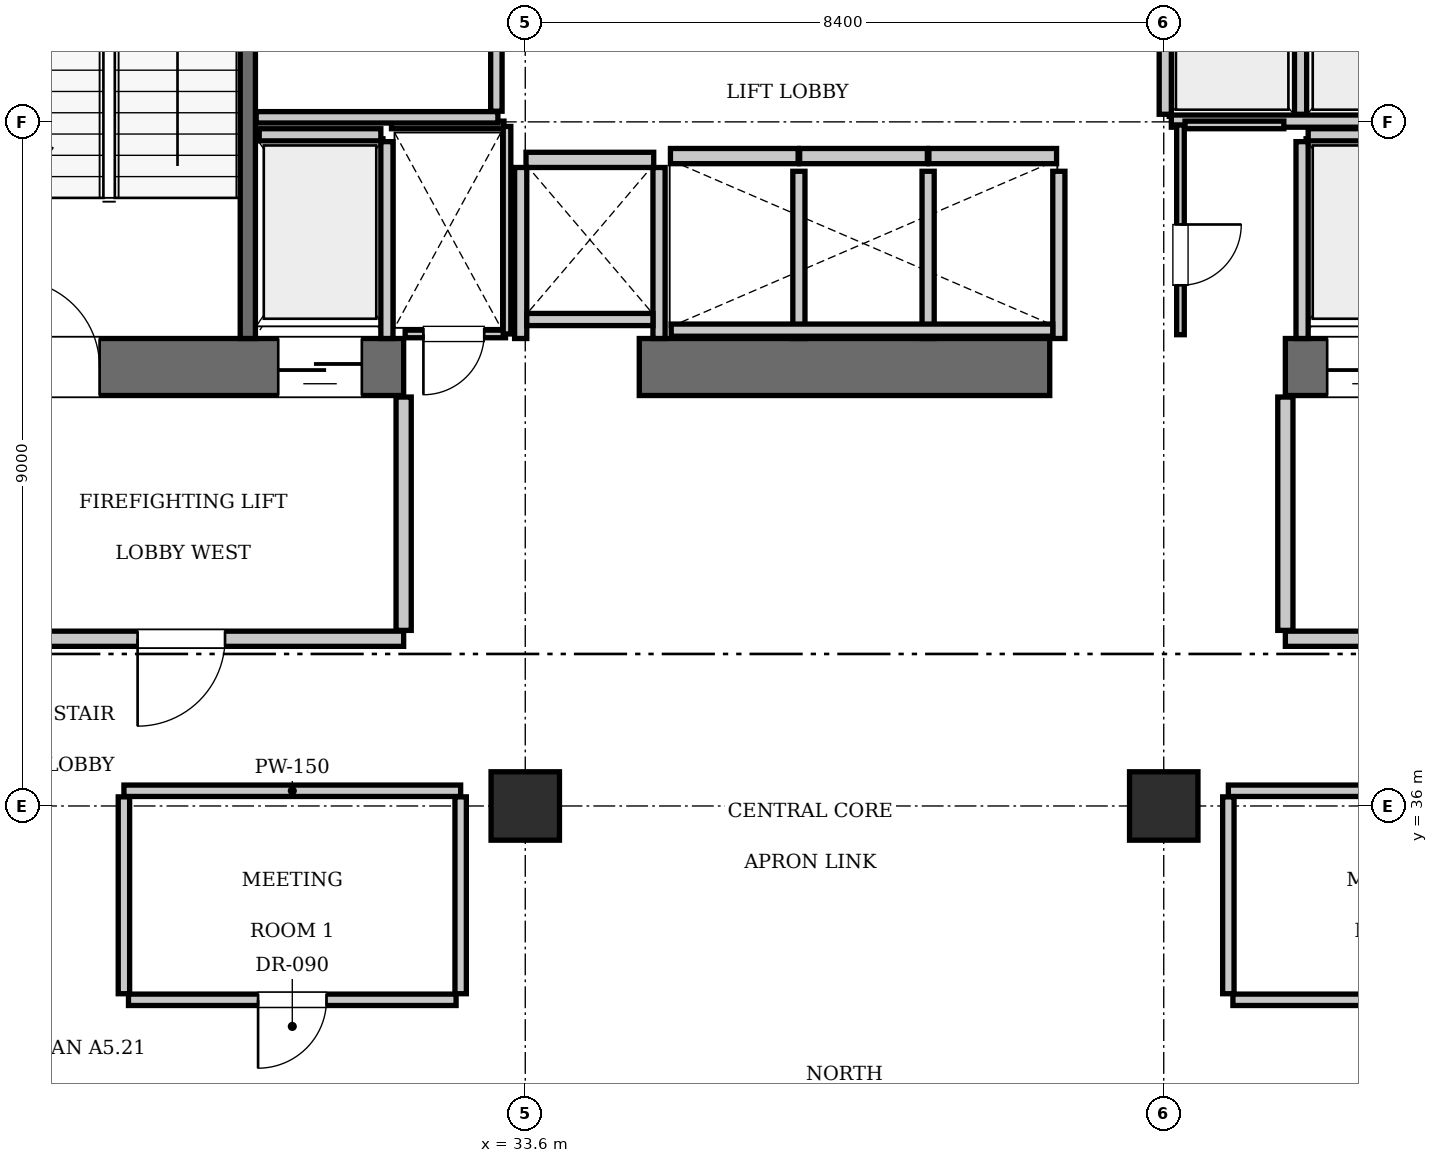
"""IFC4 building model, lengths in metres.
Left out: names, types, materials, properties, quantities, classifications, styles, units other than length and angle.
Written with IfcOpenShell. Run it as: python <this file> out.ifc"""

import sys

from ifc_helpers import new_model, si_unit, direction, frame, frame_2d, origin, origin_2d, place, context, subcontext, project, spatial, rectangle, extrude, element, fill, save


model = new_model("IFC4")
c1 = context("Model", 3, precision=1e-05, world=origin(), true_north=direction((0.0, 1.0)))
c2 = subcontext(c1, "Body", "Model", "MODEL_VIEW")
j1 = project(units=[si_unit("LENGTHUNIT", "METRE"), si_unit("PLANEANGLEUNIT", "RADIAN")], contexts=[c1])
p1 = place(None, origin())
s1 = spatial("IfcSite", under=j1, at=p1, CompositionType="ELEMENT")
p2 = place(p1, origin())
s2 = spatial("IfcBuilding", under=s1, at=p2, CompositionType="ELEMENT")
p3 = place(p2, frame((0.0, 0.0, 177.45)))
s3 = spatial("IfcBuildingStorey", under=s2, at=p3, CompositionType="ELEMENT", Elevation=177.45)
p4 = place(p3, frame((25.2, 41.775, 0.0), z_axis=(0.0, 0.0, 1.0), x_axis=(1.0, 0.0, 0.0)))
e1 = element("IfcWall", 1, at=p4, inside=s3, PredefinedType="SHEAR", context=c2, shape_type="SweptSolid", body=[
    extrude(rectangle(XDim=6.8, YDim=0.75, at=frame_2d((3.4, 0.0))), origin(), (0.0, 0.0, 1.0), 3.85),
])
p5 = place(p4, frame((1.65, 0.0, 0.0)))
e2 = element("IfcOpeningElement", 2, at=p5, cuts=e1, PredefinedType="OPENING", context=c2, shape_type="SweptSolid", body=[
    extrude(rectangle(XDim=1.15, YDim=2.15, at=frame_2d((0.575, 1.075))), frame((0.0, 0.385, 0.0), z_axis=(0.0, -1.0, 0.0), x_axis=(1.0, 0.0, 0.0)), (0.0, 0.0, 1.0), 0.77),
])
p6 = place(p4, frame((5.15, 0.0, 0.0)))
e3 = element("IfcOpeningElement", 3, at=p6, cuts=e1, PredefinedType="OPENING", context=c2, shape_type="SweptSolid", body=[
    extrude(rectangle(XDim=1.1, YDim=2.2, at=frame_2d((0.55, 1.1))), frame((0.0, 0.385, 0.0), z_axis=(0.0, -1.0, 0.0), x_axis=(1.0, 0.0, 0.0)), (0.0, 0.0, 1.0), 0.77),
])
p7 = place(p3, frame((35.1, 41.775, 0.0), z_axis=(0.0, 0.0, 1.0), x_axis=(1.0, 0.0, 0.0)))
e4 = element("IfcWall", 4, at=p7, inside=s3, PredefinedType="SHEAR", context=c2, shape_type="SweptSolid", body=[
    extrude(rectangle(XDim=5.4, YDim=0.75, at=frame_2d((2.7, 0.0))), origin(), (0.0, 0.0, 1.0), 3.85),
])
p8 = place(p3, frame((43.6, 41.775, 0.0), z_axis=(0.0, 0.0, 1.0), x_axis=(1.0, 0.0, 0.0)))
e5 = element("IfcWall", 5, at=p8, inside=s3, PredefinedType="SHEAR", context=c2, shape_type="SweptSolid", body=[
    extrude(rectangle(XDim=6.8, YDim=0.75, at=frame_2d((3.4, 0.0))), origin(), (0.0, 0.0, 1.0), 3.85),
])
p9 = place(p8, frame((3.9, 0.0, 0.0)))
e6 = element("IfcOpeningElement", 6, at=p9, cuts=e5, PredefinedType="OPENING", context=c2, shape_type="SweptSolid", body=[
    extrude(rectangle(XDim=1.15, YDim=2.15, at=frame_2d((0.575, 1.075))), frame((0.0, 0.385, 0.0), z_axis=(0.0, -1.0, 0.0), x_axis=(1.0, 0.0, 0.0)), (0.0, 0.0, 1.0), 0.77),
])
p10 = place(p8, frame((0.55, 0.0, 0.0)))
e7 = element("IfcOpeningElement", 7, at=p10, cuts=e5, PredefinedType="OPENING", context=c2, shape_type="SweptSolid", body=[
    extrude(rectangle(XDim=1.1, YDim=2.2, at=frame_2d((0.55, 1.1))), frame((0.0, 0.385, 0.0), z_axis=(0.0, -1.0, 0.0), x_axis=(1.0, 0.0, 0.0)), (0.0, 0.0, 1.0), 0.77),
])
for number, where, z_axis, x_axis in (
    (8, (33.6, 36.0, 0.0), (0.0, 0.0, 1.0), (1.0, 0.0, 0.0)),
    (9, (42.0, 36.0, 0.0), (0.0, 0.0, 1.0), (1.0, 0.0, 0.0)),
):
    element("IfcColumn", number, at=place(p3, frame(where, z_axis=z_axis, x_axis=x_axis)), inside=s3, PredefinedType="COLUMN", context=c2, shape_type="SweptSolid", body=[
        extrude(rectangle(XDim=0.9, YDim=0.9, at=origin_2d()), origin(), (0.0, 0.0, 1.0), 3.85),
    ])
p11 = place(p3, frame((29.95, 42.15, 0.0), z_axis=(0.0, 0.0, 1.0), x_axis=(0.0, 1.0, 0.0)))
e10 = element("IfcWall", 10, at=p11, inside=s3, PredefinedType="SOLIDWALL", context=c2, shape_type="SweptSolid", body=[
    extrude(rectangle(XDim=9.0, YDim=0.2, at=frame_2d((4.5, 0.0))), origin(), (0.0, 0.0, 1.0), 3.61),
])
for number, where, z_axis, x_axis in (
    (11, (35.51, 44.55, 0.0), (0.0, 0.0, 1.0), (1.0, 0.0, 0.0)),
    (12, (37.21, 44.55, 0.0), (0.0, 0.0, 1.0), (1.0, 0.0, 0.0)),
):
    element("IfcWall", number, at=place(p3, frame(where, z_axis=z_axis, x_axis=x_axis)), inside=s3, PredefinedType="SOLIDWALL", context=c2, shape_type="SweptSolid", body=[
        extrude(rectangle(XDim=1.68, YDim=0.2, at=frame_2d((0.84, 0.0))), origin(), (0.0, 0.0, 1.0), 3.61),
    ])
p12 = place(p3, frame((38.91, 44.55, 0.0), z_axis=(0.0, 0.0, 1.0), x_axis=(1.0, 0.0, 0.0)))
e13 = element("IfcWall", 13, at=p12, inside=s3, PredefinedType="SOLIDWALL", context=c2, shape_type="SweptSolid", body=[
    extrude(rectangle(XDim=1.68, YDim=0.2, at=frame_2d((0.84, 0.0))), origin(), (0.0, 0.0, 1.0), 3.61),
])
p13 = place(p3, frame((33.61, 44.5, 0.0), z_axis=(0.0, 0.0, 1.0), x_axis=(1.0, 0.0, 0.0)))
e14 = element("IfcWall", 14, at=p13, inside=s3, PredefinedType="SOLIDWALL", context=c2, shape_type="SweptSolid", body=[
    extrude(rectangle(XDim=1.68, YDim=0.2, at=frame_2d((0.84, 0.0))), origin(), (0.0, 0.0, 1.0), 3.61),
])
p14 = place(p3, frame((30.1, 44.83, 0.0), z_axis=(0.0, 0.0, 1.0), x_axis=(1.0, 0.0, 0.0)))
e15 = element("IfcWall", 15, at=p14, inside=s3, PredefinedType="SOLIDWALL", context=c2, shape_type="SweptSolid", body=[
    extrude(rectangle(XDim=1.6, YDim=0.16, at=frame_2d((0.8, 0.0))), origin(), (0.0, 0.0, 1.0), 3.61),
])
p15 = place(p3, frame((31.78, 42.15, 0.0), z_axis=(0.0, 0.0, 1.0), x_axis=(0.0, 1.0, 0.0)))
e16 = element("IfcWall", 16, at=p15, inside=s3, PredefinedType="SOLIDWALL", context=c2, shape_type="SweptSolid", body=[
    extrude(rectangle(XDim=2.59, YDim=0.16, at=frame_2d((1.295, 0.0))), origin(), (0.0, 0.0, 1.0), 3.61),
])
p16 = place(p3, frame((43.9, 44.83, 0.0), z_axis=(0.0, 0.0, 1.0), x_axis=(1.0, 0.0, 0.0)))
e17 = element("IfcWall", 17, at=p16, inside=s3, PredefinedType="SOLIDWALL", context=c2, shape_type="SweptSolid", body=[
    extrude(rectangle(XDim=1.6, YDim=0.16, at=frame_2d((0.8, 0.0))), origin(), (0.0, 0.0, 1.0), 3.61),
])
p17 = place(p3, frame((43.82, 42.15, 0.0), z_axis=(0.0, 0.0, 1.0), x_axis=(0.0, 1.0, 0.0)))
e18 = element("IfcWall", 18, at=p17, inside=s3, PredefinedType="SOLIDWALL", context=c2, shape_type="SweptSolid", body=[
    extrude(rectangle(XDim=2.59, YDim=0.16, at=frame_2d((1.295, 0.0))), origin(), (0.0, 0.0, 1.0), 3.61),
])
for number, where, z_axis, x_axis in (
    (19, (42.02, 45.1, 0.0), (0.0, 0.0, 1.0), (0.0, 1.0, 0.0)),
    (20, (43.8, 45.1, 0.0), (0.0, 0.0, 1.0), (0.0, 1.0, 0.0)),
):
    element("IfcWall", number, at=place(p3, frame(where, z_axis=z_axis, x_axis=x_axis)), inside=s3, PredefinedType="SOLIDWALL", context=c2, shape_type="SweptSolid", body=[
        extrude(rectangle(XDim=1.95, YDim=0.16, at=frame_2d((0.975, 0.0))), origin(), (0.0, 0.0, 1.0), 3.61),
    ])
p18 = place(p3, frame((42.1, 45.01, 0.0), z_axis=(0.0, 0.0, 1.0), x_axis=(1.0, 0.0, 0.0)))
e21 = element("IfcWall", 21, at=p18, inside=s3, PredefinedType="SOLIDWALL", context=c2, shape_type="SweptSolid", body=[
    extrude(rectangle(XDim=3.45, YDim=0.16, at=frame_2d((1.725, 0.0))), origin(), (0.0, 0.0, 1.0), 3.61),
])
for number, where, z_axis, x_axis in (
    (22, (37.2, 42.15, 0.0), (0.0, 0.0, 1.0), (0.0, 1.0, 0.0)),
    (23, (38.9, 42.15, 0.0), (0.0, 0.0, 1.0), (0.0, 1.0, 0.0)),
    (24, (40.62, 42.15, 0.0), (0.0, 0.0, 1.0), (0.0, 1.0, 0.0)),
):
    element("IfcWall", number, at=place(p3, frame(where, z_axis=z_axis, x_axis=x_axis)), inside=s3, PredefinedType="SOLIDWALL", context=c2, shape_type="SweptSolid", body=[
        extrude(rectangle(XDim=2.2, YDim=0.16, at=frame_2d((1.1, 0.0))), origin(), (0.0, 0.0, 1.0), 3.61),
    ])
p19 = place(p3, frame((35.52, 42.26, 0.0), z_axis=(0.0, 0.0, 1.0), x_axis=(1.0, 0.0, 0.0)))
e25 = element("IfcWall", 25, at=p19, inside=s3, PredefinedType="SOLIDWALL", context=c2, shape_type="SweptSolid", body=[
    extrude(rectangle(XDim=5.02, YDim=0.16, at=frame_2d((2.51, 0.0))), origin(), (0.0, 0.0, 1.0), 3.61),
])
for number, where, z_axis, x_axis in (
    (26, (33.54, 42.15, 0.0), (0.0, 0.0, 1.0), (0.0, 1.0, 0.0)),
    (27, (35.36, 42.15, 0.0), (0.0, 0.0, 1.0), (0.0, 1.0, 0.0)),
):
    element("IfcWall", number, at=place(p3, frame(where, z_axis=z_axis, x_axis=x_axis)), inside=s3, PredefinedType="SOLIDWALL", context=c2, shape_type="SweptSolid", body=[
        extrude(rectangle(XDim=2.25, YDim=0.16, at=frame_2d((1.125, 0.0))), origin(), (0.0, 0.0, 1.0), 3.61),
    ])
p20 = place(p3, frame((33.62, 42.4, 0.0), z_axis=(0.0, 0.0, 1.0), x_axis=(1.0, 0.0, 0.0)))
e28 = element("IfcWall", 28, at=p20, inside=s3, PredefinedType="SOLIDWALL", context=c2, shape_type="SweptSolid", body=[
    extrude(rectangle(XDim=1.66, YDim=0.16, at=frame_2d((0.83, 0.0))), origin(), (0.0, 0.0, 1.0), 3.61),
])
p21 = place(p3, frame((26.2, 38.2, 0.0), z_axis=(0.0, 0.0, 1.0), x_axis=(1.0, 0.0, 0.0)))
e29 = element("IfcWall", 29, at=p21, inside=s3, PredefinedType="PARTITIONING", context=c2, shape_type="SweptSolid", body=[
    extrude(rectangle(XDim=5.8, YDim=0.2, at=frame_2d((2.9, 0.0))), origin(), (0.0, 0.0, 1.0), 3.61),
])
p22 = place(p21, frame((2.3, 0.0, 0.0)))
e30 = element("IfcOpeningElement", 30, at=p22, cuts=e29, PredefinedType="OPENING", context=c2, shape_type="SweptSolid", body=[
    extrude(rectangle(XDim=1.15, YDim=2.15, at=frame_2d((0.575, 1.075))), frame((0.0, 0.11, 0.0), z_axis=(0.0, -1.0, 0.0), x_axis=(1.0, 0.0, 0.0)), (0.0, 0.0, 1.0), 0.22),
])
p23 = place(p3, frame((32.0, 38.31, 0.0), z_axis=(0.0, 0.0, 1.0), x_axis=(0.0, 1.0, 0.0)))
e31 = element("IfcWall", 31, at=p23, inside=s3, PredefinedType="PARTITIONING", context=c2, shape_type="SweptSolid", body=[
    extrude(rectangle(XDim=3.07, YDim=0.2, at=frame_2d((1.535, 0.0))), origin(), (0.0, 0.0, 1.0), 3.61),
])
p24 = place(p3, frame((43.6, 38.2, 0.0), z_axis=(0.0, 0.0, 1.0), x_axis=(1.0, 0.0, 0.0)))
e32 = element("IfcWall", 32, at=p24, inside=s3, PredefinedType="PARTITIONING", context=c2, shape_type="SweptSolid", body=[
    extrude(rectangle(XDim=5.8, YDim=0.2, at=frame_2d((2.9, 0.0))), origin(), (0.0, 0.0, 1.0), 3.61),
])
p25 = place(p24, frame((2.3, 0.0, 0.0)))
e33 = element("IfcOpeningElement", 33, at=p25, cuts=e32, PredefinedType="OPENING", context=c2, shape_type="SweptSolid", body=[
    extrude(rectangle(XDim=1.15, YDim=2.15, at=frame_2d((0.575, 1.075))), frame((0.0, 0.11, 0.0), z_axis=(0.0, -1.0, 0.0), x_axis=(1.0, 0.0, 0.0)), (0.0, 0.0, 1.0), 0.22),
])
p26 = place(p3, frame((43.6, 38.31, 0.0), z_axis=(0.0, 0.0, 1.0), x_axis=(0.0, 1.0, 0.0)))
e34 = element("IfcWall", 34, at=p26, inside=s3, PredefinedType="PARTITIONING", context=c2, shape_type="SweptSolid", body=[
    extrude(rectangle(XDim=3.07, YDim=0.2, at=frame_2d((1.535, 0.0))), origin(), (0.0, 0.0, 1.0), 3.61),
])
p27 = place(p3, frame((32.02, 42.21, 0.0), z_axis=(0.0, 0.0, 1.0), x_axis=(1.0, 0.0, 0.0)))
e35 = element("IfcWall", 35, at=p27, inside=s3, PredefinedType="PARTITIONING", context=c2, shape_type="SweptSolid", body=[
    extrude(rectangle(XDim=1.32, YDim=0.1, at=frame_2d((0.66, 0.0))), origin(), (0.0, 0.0, 1.0), 3.61),
])
p28 = place(p27, frame((0.24, 0.0, 0.0)))
e36 = element("IfcOpeningElement", 36, at=p28, cuts=e35, PredefinedType="OPENING", context=c2, shape_type="SweptSolid", body=[
    extrude(rectangle(XDim=0.8, YDim=2.05, at=frame_2d((0.4, 1.025))), frame((0.0, 0.06, 0.0), z_axis=(0.0, -1.0, 0.0), x_axis=(1.0, 0.0, 0.0)), (0.0, 0.0, 1.0), 0.12),
])
p29 = place(p3, frame((31.84, 44.96, 0.0), z_axis=(0.0, 0.0, 1.0), x_axis=(1.0, 0.0, 0.0)))
e37 = element("IfcWall", 37, at=p29, inside=s3, PredefinedType="PARTITIONING", context=c2, shape_type="SweptSolid", body=[
    extrude(rectangle(XDim=1.48, YDim=0.1, at=frame_2d((0.74, 0.0))), origin(), (0.0, 0.0, 1.0), 3.61),
])
p30 = place(p3, frame((33.36, 42.21, 0.0), z_axis=(0.0, 0.0, 1.0), x_axis=(0.0, 1.0, 0.0)))
e38 = element("IfcWall", 38, at=p30, inside=s3, PredefinedType="PARTITIONING", context=c2, shape_type="SweptSolid", body=[
    extrude(rectangle(XDim=2.73, YDim=0.1, at=frame_2d((1.365, 0.0))), origin(), (0.0, 0.0, 1.0), 3.61),
])
p31 = place(p3, frame((42.22, 42.2, 0.0), z_axis=(0.0, 0.0, 1.0), x_axis=(0.0, 1.0, 0.0)))
e39 = element("IfcWall", 39, at=p31, inside=s3, PredefinedType="PARTITIONING", context=c2, shape_type="SweptSolid", body=[
    extrude(rectangle(XDim=2.76, YDim=0.1, at=frame_2d((1.38, 0.0))), origin(), (0.0, 0.0, 1.0), 3.61),
])
p32 = place(p31, frame((0.65, 0.0, 0.0)))
e40 = element("IfcOpeningElement", 40, at=p32, cuts=e39, PredefinedType="OPENING", context=c2, shape_type="SweptSolid", body=[
    extrude(rectangle(XDim=0.8, YDim=2.05, at=frame_2d((0.4, 1.025))), frame((0.0, 0.06, 0.0), z_axis=(0.0, -1.0, 0.0), x_axis=(1.0, 0.0, 0.0)), (0.0, 0.0, 1.0), 0.12),
])
p33 = place(p3, frame((42.28, 44.96, 0.0), z_axis=(0.0, 0.0, 1.0), x_axis=(1.0, 0.0, 0.0)))
e41 = element("IfcWall", 41, at=p33, inside=s3, PredefinedType="PARTITIONING", context=c2, shape_type="SweptSolid", body=[
    extrude(rectangle(XDim=1.3, YDim=0.1, at=frame_2d((0.65, 0.0))), origin(), (0.0, 0.0, 1.0), 3.61),
])
p34 = place(p3, frame((30.06, 45.06, 0.0), z_axis=(0.0, 0.0, 1.0), x_axis=(1.0, 0.0, 0.0)))
e42 = element("IfcWall", 42, at=p34, inside=s3, PredefinedType="PARTITIONING", context=c2, shape_type="SweptSolid", body=[
    extrude(rectangle(XDim=3.18, YDim=0.15, at=frame_2d((1.59, 0.0))), origin(), (0.0, 0.0, 1.0), 3.61),
])
p35 = place(p3, frame((33.22, 45.14, 0.0), z_axis=(0.0, 0.0, 1.0), x_axis=(0.0, 1.0, 0.0)))
e43 = element("IfcWall", 43, at=p35, inside=s3, PredefinedType="PARTITIONING", context=c2, shape_type="SweptSolid", body=[
    extrude(rectangle(XDim=4.16, YDim=0.15, at=frame_2d((2.08, 0.0))), origin(), (0.0, 0.0, 1.0), 3.61),
])
p36 = place(p3, frame((28.32, 36.2, 0.0), z_axis=(0.0, 0.0, 1.0), x_axis=(1.0, 0.0, 0.0)))
e44 = element("IfcWall", 44, at=p36, inside=s3, PredefinedType="PARTITIONING", context=c2, shape_type="SweptSolid", body=[
    extrude(rectangle(XDim=4.43, YDim=0.15, at=frame_2d((2.215, 0.0))), origin(), (0.0, 0.0, 1.0), 3.61),
])
for number, where, z_axis, x_axis in (
    (45, (28.32, 33.53, 0.0), (0.0, 0.0, 1.0), (0.0, 1.0, 0.0)),
    (46, (32.75, 33.53, 0.0), (0.0, 0.0, 1.0), (0.0, 1.0, 0.0)),
):
    element("IfcWall", number, at=place(p3, frame(where, z_axis=z_axis, x_axis=x_axis)), inside=s3, PredefinedType="PARTITIONING", context=c2, shape_type="SweptSolid", body=[
        extrude(rectangle(XDim=2.59, YDim=0.15, at=frame_2d((1.295, 0.0))), origin(), (0.0, 0.0, 1.0), 3.61),
    ])
p37 = place(p3, frame((28.38, 33.45, 0.0), z_axis=(0.0, 0.0, 1.0), x_axis=(1.0, 0.0, 0.0)))
e47 = element("IfcWall", 47, at=p37, inside=s3, PredefinedType="PARTITIONING", context=c2, shape_type="SweptSolid", body=[
    extrude(rectangle(XDim=4.31, YDim=0.15, at=frame_2d((2.155, 0.0))), origin(), (0.0, 0.0, 1.0), 3.61),
])
p38 = place(p37, frame((1.705, 0.0, 0.0)))
e48 = element("IfcOpeningElement", 48, at=p38, cuts=e47, PredefinedType="OPENING", context=c2, shape_type="SweptSolid", body=[
    extrude(rectangle(XDim=0.9, YDim=2.1, at=frame_2d((0.45, 1.05))), frame((0.0, 0.085, 0.0), z_axis=(0.0, -1.0, 0.0), x_axis=(1.0, 0.0, 0.0)), (0.0, 0.0, 1.0), 0.17),
])
p39 = place(p3, frame((42.85, 36.2, 0.0), z_axis=(0.0, 0.0, 1.0), x_axis=(1.0, 0.0, 0.0)))
e49 = element("IfcWall", 49, at=p39, inside=s3, PredefinedType="PARTITIONING", context=c2, shape_type="SweptSolid", body=[
    extrude(rectangle(XDim=4.43, YDim=0.15, at=frame_2d((2.215, 0.0))), origin(), (0.0, 0.0, 1.0), 3.61),
])
p40 = place(p3, frame((42.85, 33.53, 0.0), z_axis=(0.0, 0.0, 1.0), x_axis=(0.0, 1.0, 0.0)))
e50 = element("IfcWall", 50, at=p40, inside=s3, PredefinedType="PARTITIONING", context=c2, shape_type="SweptSolid", body=[
    extrude(rectangle(XDim=2.59, YDim=0.15, at=frame_2d((1.295, 0.0))), origin(), (0.0, 0.0, 1.0), 3.61),
])
p41 = place(p3, frame((42.91, 33.45, 0.0), z_axis=(0.0, 0.0, 1.0), x_axis=(1.0, 0.0, 0.0)))
e51 = element("IfcWall", 51, at=p41, inside=s3, PredefinedType="PARTITIONING", context=c2, shape_type="SweptSolid", body=[
    extrude(rectangle(XDim=4.31, YDim=0.15, at=frame_2d((2.155, 0.0))), origin(), (0.0, 0.0, 1.0), 3.61),
])
p42 = place(p41, frame((1.705, 0.0, 0.0)))
e52 = element("IfcOpeningElement", 52, at=p42, cuts=e51, PredefinedType="OPENING", context=c2, shape_type="SweptSolid", body=[
    extrude(rectangle(XDim=0.9, YDim=2.1, at=frame_2d((0.45, 1.05))), frame((0.0, 0.085, 0.0), z_axis=(0.0, -1.0, 0.0), x_axis=(1.0, 0.0, 0.0)), (0.0, 0.0, 1.0), 0.17),
])
p43 = place(p5, origin())
e53 = element("IfcDoor", 53, at=p43, inside=s3, OperationType="SINGLE_SWING_LEFT", PredefinedType="DOOR", context=c2, shape_type="SweptSolid", body=[
    extrude(rectangle(XDim=1.15, YDim=2.15, at=frame_2d((0.575, 1.075))), frame((0.0, 0.025, 0.0), z_axis=(0.0, -1.0, 0.0), x_axis=(1.0, 0.0, 0.0)), (0.0, 0.0, 1.0), 0.05),
])
fill(e2, e53)
p44 = place(p6, frame((1.1, 0.0, 0.0), z_axis=(0.0, 0.0, 1.0), x_axis=(-1.0, 0.0, 0.0)))
e54 = element("IfcDoor", 54, at=p44, inside=s3, OperationType="SLIDING_TO_LEFT", PredefinedType="DOOR", context=c2, shape_type="SweptSolid", body=[
    extrude(rectangle(XDim=1.1, YDim=2.2, at=frame_2d((0.55, 1.1))), frame((0.0, 0.025, 0.0), z_axis=(0.0, -1.0, 0.0), x_axis=(1.0, 0.0, 0.0)), (0.0, 0.0, 1.0), 0.05),
])
fill(e3, e54)
p45 = place(p10, frame((1.1, 0.0, 0.0), z_axis=(0.0, 0.0, 1.0), x_axis=(-1.0, 0.0, 0.0)))
e55 = element("IfcDoor", 55, at=p45, inside=s3, OperationType="SLIDING_TO_LEFT", PredefinedType="DOOR", context=c2, shape_type="SweptSolid", body=[
    extrude(rectangle(XDim=1.1, YDim=2.2, at=frame_2d((0.55, 1.1))), frame((0.0, 0.025, 0.0), z_axis=(0.0, -1.0, 0.0), x_axis=(1.0, 0.0, 0.0)), (0.0, 0.0, 1.0), 0.05),
])
fill(e7, e55)
p46 = place(p22, frame((1.15, 0.0, 0.0), z_axis=(0.0, 0.0, 1.0), x_axis=(-1.0, 0.0, 0.0)))
e56 = element("IfcDoor", 56, at=p46, inside=s3, OperationType="SINGLE_SWING_RIGHT", PredefinedType="DOOR", context=c2, shape_type="SweptSolid", body=[
    extrude(rectangle(XDim=1.15, YDim=2.15, at=frame_2d((0.575, 1.075))), frame((0.0, 0.025, 0.0), z_axis=(0.0, -1.0, 0.0), x_axis=(1.0, 0.0, 0.0)), (0.0, 0.0, 1.0), 0.05),
])
fill(e30, e56)
p47 = place(p28, frame((0.8, 0.0, 0.0), z_axis=(0.0, 0.0, 1.0), x_axis=(-1.0, 0.0, 0.0)))
e57 = element("IfcDoor", 57, at=p47, inside=s3, OperationType="SINGLE_SWING_RIGHT", PredefinedType="DOOR", context=c2, shape_type="SweptSolid", body=[
    extrude(rectangle(XDim=0.8, YDim=2.05, at=frame_2d((0.4, 1.025))), frame((0.0, 0.025, 0.0), z_axis=(0.0, -1.0, 0.0), x_axis=(1.0, 0.0, 0.0)), (0.0, 0.0, 1.0), 0.05),
])
fill(e36, e57)
p48 = place(p32, frame((0.8, 0.0, 0.0), z_axis=(0.0, 0.0, 1.0), x_axis=(-1.0, 0.0, 0.0)))
e58 = element("IfcDoor", 58, at=p48, inside=s3, OperationType="SINGLE_SWING_LEFT", PredefinedType="DOOR", context=c2, shape_type="SweptSolid", body=[
    extrude(rectangle(XDim=0.8, YDim=2.05, at=frame_2d((0.4, 1.025))), frame((0.0, 0.025, 0.0), z_axis=(0.0, -1.0, 0.0), x_axis=(1.0, 0.0, 0.0)), (0.0, 0.0, 1.0), 0.05),
])
fill(e40, e58)
p49 = place(p38, frame((0.9, 0.0, 0.0), z_axis=(0.0, 0.0, 1.0), x_axis=(-1.0, 0.0, 0.0)))
e59 = element("IfcDoor", 59, at=p49, inside=s3, OperationType="SINGLE_SWING_RIGHT", PredefinedType="DOOR", context=c2, shape_type="SweptSolid", body=[
    extrude(rectangle(XDim=0.9, YDim=2.1, at=frame_2d((0.45, 1.05))), frame((0.0, 0.025, 0.0), z_axis=(0.0, -1.0, 0.0), x_axis=(1.0, 0.0, 0.0)), (0.0, 0.0, 1.0), 0.05),
])
fill(e48, e59)
save(model, sys.argv[1])
